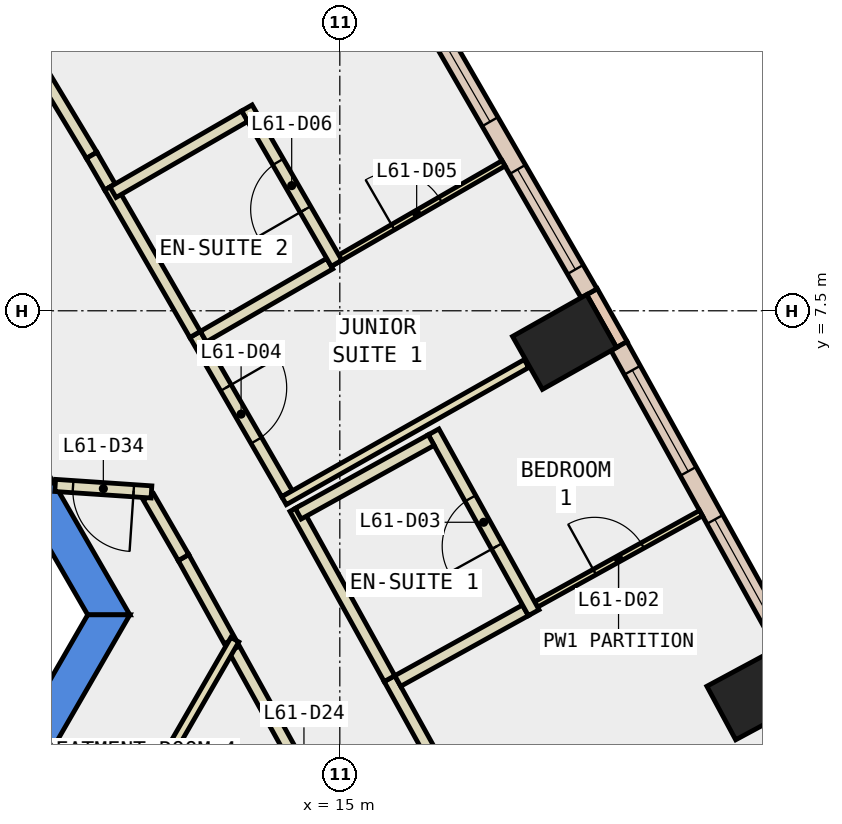
"""IFC4 building model, lengths in metres.
Left out: names, types, materials, properties, quantities, classifications, styles, units other than length and angle.
Written with IfcOpenShell. Run it as: python <this file> out.ifc"""

import sys

from ifc_helpers import new_model, si_unit, direction, frame, frame_2d, origin, origin_2d, place, context, subcontext, project, spatial, polyline, rectangle, outline, extrude, element, fill, save


model = new_model("IFC4")
c1 = context("Model", 3, precision=1e-05, world=origin(), true_north=direction((0.0, 1.0)))
c2 = subcontext(c1, "Body", "Model", "MODEL_VIEW")
j1 = project(units=[si_unit("LENGTHUNIT", "METRE"), si_unit("PLANEANGLEUNIT", "RADIAN")], contexts=[c1])
p1 = place(None, origin())
s1 = spatial("IfcSite", under=j1, at=p1, CompositionType="ELEMENT")
p2 = place(p1, origin())
s2 = spatial("IfcBuilding", under=s1, at=p2, CompositionType="ELEMENT")
p3 = place(p2, frame((0.0, 0.0, 266.6)))
s3 = spatial("IfcBuildingStorey", under=s2, at=p3, CompositionType="ELEMENT", Elevation=266.6)
for number, where, z_axis, x_axis in (
    (1, (21.89, 1.217, -0.34), (0.0, 0.0, 1.0), (-0.474, 0.881, 0.0)),
    (2, (18.696, 6.987, -0.34), (0.0, 0.0, 1.0), (-0.491, 0.871, 0.0)),
):
    element("IfcColumn", number, at=place(p3, frame(where, z_axis=z_axis, x_axis=x_axis)), inside=s3, PredefinedType="COLUMN", context=c2, shape_type="SweptSolid", body=[
        extrude(rectangle(XDim=1.0, YDim=1.4, at=origin_2d()), origin(), (0.0, 0.0, 1.0), 3.6),
    ])
p4 = place(p3, frame((0.0, 0.0, -0.34)))
e3 = element("IfcWall", 3, at=p4, inside=s3, PredefinedType="SHEAR", context=c2, shape_type="SweptSolid", body=[
    extrude(outline(polyline([(6.786, 10.747), (6.266, 10.447), (10.854, 2.5), (11.547, 2.5), (6.786, 10.747)])), origin(), (0.0, 0.0, 1.0), 3.6),
])
p5 = place(p3, frame((0.0, 0.0, -0.34)))
e4 = element("IfcWall", 4, at=p5, inside=s3, PredefinedType="SHEAR", context=c2, shape_type="SweptSolid", body=[
    extrude(outline(polyline([(5.774, -7.5), (11.547, 2.5), (10.854, 2.5), (5.427, -6.9), (5.774, -7.5)])), origin(), (0.0, 0.0, 1.0), 3.6),
])
p6 = place(p3, frame((19.639, 6.944, 0.0), z_axis=(0.0, 0.0, 1.0), x_axis=(-0.491848119507, 0.870681013539, 0.0)))
e5 = element("IfcWall", 5, at=p6, inside=s3, PredefinedType="STANDARD", context=c2, shape_type="SweptSolid", body=[
    extrude(rectangle(XDim=1.0, YDim=0.2, at=frame_2d((0.5, 0.0))), origin(), (0.0, 0.0, 1.0), 3.26),
])
p7 = place(p3, frame((22.308, 2.01, 0.0), z_axis=(0.0, 0.0, 1.0), x_axis=(-0.484260568952, 0.874923826032, 0.0)))
e6 = element("IfcWall", 6, at=p7, inside=s3, PredefinedType="STANDARD", context=c2, shape_type="SweptSolid", body=[
    extrude(rectangle(XDim=5.611, YDim=0.3, at=frame_2d((2.805, 0.0))), origin(), (0.0, 0.0, 1.0), 3.26),
])
p8 = place(p7, frame((0.453, 0.0, 0.9)))
e7 = element("IfcOpeningElement", 7, at=p8, cuts=e6, PredefinedType="OPENING", context=c2, shape_type="SweptSolid", body=[
    extrude(rectangle(XDim=1.9, YDim=2.0, at=frame_2d((0.95, 1.0))), frame((0.0, 0.16, 0.0), z_axis=(0.0, -1.0, 0.0), x_axis=(1.0, 0.0, 0.0)), (0.0, 0.0, 1.0), 0.32),
])
p9 = place(p7, frame((3.258, 0.0, 0.9)))
e8 = element("IfcOpeningElement", 8, at=p9, cuts=e6, PredefinedType="OPENING", context=c2, shape_type="SweptSolid", body=[
    extrude(rectangle(XDim=1.9, YDim=2.0, at=frame_2d((0.95, 1.0))), frame((0.0, 0.16, 0.0), z_axis=(0.0, -1.0, 0.0), x_axis=(1.0, 0.0, 0.0)), (0.0, 0.0, 1.0), 0.32),
])
p10 = place(p3, frame((19.1, 7.787, 0.0), z_axis=(0.0, 0.0, 1.0), x_axis=(-0.500041292042, 0.866001562501, 0.0)))
e9 = element("IfcWall", 9, at=p10, inside=s3, PredefinedType="STANDARD", context=c2, shape_type="SweptSolid", body=[
    extrude(rectangle(XDim=5.612, YDim=0.3, at=frame_2d((2.806, 0.0))), origin(), (0.0, 0.0, 1.0), 3.26),
])
p11 = place(p10, frame((0.453, 0.0, 0.9)))
e10 = element("IfcOpeningElement", 10, at=p11, cuts=e9, PredefinedType="OPENING", context=c2, shape_type="SweptSolid", body=[
    extrude(rectangle(XDim=1.9, YDim=2.0, at=frame_2d((0.95, 1.0))), frame((0.0, 0.16, 0.0), z_axis=(0.0, -1.0, 0.0), x_axis=(1.0, 0.0, 0.0)), (0.0, 0.0, 1.0), 0.32),
])
p12 = place(p10, frame((3.259, 0.0, 0.9)))
e11 = element("IfcOpeningElement", 11, at=p12, cuts=e9, PredefinedType="OPENING", context=c2, shape_type="SweptSolid", body=[
    extrude(rectangle(XDim=1.9, YDim=2.0, at=frame_2d((0.95, 1.0))), frame((0.0, 0.16, 0.0), z_axis=(0.0, -1.0, 0.0), x_axis=(1.0, 0.0, 0.0)), (0.0, 0.0, 1.0), 0.32),
])
p13 = place(p3, frame((13.188, 2.071, 0.0), z_axis=(0.0, 0.0, 1.0), x_axis=(-0.484398936474, 0.874847226859, 0.0)))
e12 = element("IfcWall", 12, at=p13, inside=s3, PredefinedType="PARTITIONING", context=c2, shape_type="SweptSolid", body=[
    extrude(rectangle(XDim=1.567, YDim=0.2, at=frame_2d((0.783, 0.0))), origin(), (0.0, 0.0, 1.0), 3.26),
])
p14 = place(p3, frame((12.429, 3.442, 0.0), z_axis=(0.0, 0.0, 1.0), x_axis=(-0.500076612374, 0.865981167091, 0.0)))
e13 = element("IfcWall", 13, at=p14, inside=s3, PredefinedType="PARTITIONING", context=c2, shape_type="SweptSolid", body=[
    extrude(rectangle(XDim=1.154, YDim=0.2, at=frame_2d((0.577, 0.0))), origin(), (0.0, 0.0, 1.0), 3.26),
])
p15 = place(p3, frame((11.902, 4.521, 0.0), z_axis=(0.0, 0.0, 1.0), x_axis=(-0.997726217037, 0.067397298437, 0.0)))
e14 = element("IfcWall", 14, at=p15, inside=s3, PredefinedType="PARTITIONING", context=c2, shape_type="SweptSolid", body=[
    extrude(rectangle(XDim=1.587, YDim=0.2, at=frame_2d((0.793, 0.0))), origin(), (0.0, 0.0, 1.0), 3.26),
])
p16 = place(p15, frame((0.293, 0.0, 0.0)))
e15 = element("IfcOpeningElement", 15, at=p16, cuts=e14, PredefinedType="OPENING", context=c2, shape_type="SweptSolid", body=[
    extrude(rectangle(XDim=1.0, YDim=2.1, at=frame_2d((0.5, 1.05))), frame((0.0, 0.11, 0.0), z_axis=(0.0, -1.0, 0.0), x_axis=(1.0, 0.0, 0.0)), (0.0, 0.0, 1.0), 0.22),
])
p17 = place(p3, frame((15.56, -2.214, 0.0), z_axis=(0.0, 0.0, 1.0), x_axis=(-0.484323615817, 0.874888927329, 0.0)))
e16 = element("IfcWall", 16, at=p17, inside=s3, PredefinedType="PARTITIONING", context=c2, shape_type="SweptSolid", body=[
    extrude(rectangle(XDim=4.747, YDim=0.2, at=frame_2d((2.374, 0.0))), origin(), (0.0, 0.0, 1.0), 3.26),
])
p18 = place(p17, frame((1.874, 0.0, 0.0)))
e17 = element("IfcOpeningElement", 17, at=p18, cuts=e16, PredefinedType="OPENING", context=c2, shape_type="SweptSolid", body=[
    extrude(rectangle(XDim=1.0, YDim=2.1, at=frame_2d((0.5, 1.05))), frame((0.0, 0.11, 0.0), z_axis=(0.0, -1.0, 0.0), x_axis=(1.0, 0.0, 0.0)), (0.0, 0.0, 1.0), 0.22),
])
p19 = place(p3, frame((15.817, 1.451, 0.0), z_axis=(0.0, 0.0, 1.0), x_axis=(0.48417811398, -0.874969458863, 0.0)))
e18 = element("IfcWall", 18, at=p19, inside=s3, PredefinedType="PARTITIONING", context=c2, shape_type="SweptSolid", body=[
    extrude(rectangle(XDim=3.101, YDim=0.2, at=frame_2d((1.55, 0.0))), origin(), (0.0, 0.0, 1.0), 3.26),
])
p20 = place(p3, frame((14.267, 4.25, 0.0), z_axis=(0.0, 0.0, 1.0), x_axis=(0.4843920198, -0.874851056554, 0.0)))
e19 = element("IfcWall", 19, at=p20, inside=s3, PredefinedType="PARTITIONING", context=c2, shape_type="SweptSolid", body=[
    extrude(rectangle(XDim=3.199, YDim=0.2, at=frame_2d((1.6, 0.0))), origin(), (0.0, 0.0, 1.0), 3.26),
])
p21 = place(p3, frame((12.62, 7.111, 0.0), z_axis=(0.0, 0.0, 1.0), x_axis=(0.499950733426, -0.866053845986, 0.0)))
e20 = element("IfcWall", 20, at=p21, inside=s3, PredefinedType="PARTITIONING", context=c2, shape_type="SweptSolid", body=[
    extrude(rectangle(XDim=3.024, YDim=0.2, at=frame_2d((1.512, 0.0))), origin(), (0.0, 0.0, 1.0), 3.26),
])
p22 = place(p21, frame((1.013, 0.0, 0.0)))
e21 = element("IfcOpeningElement", 21, at=p22, cuts=e20, PredefinedType="OPENING", context=c2, shape_type="SweptSolid", body=[
    extrude(rectangle(XDim=1.0, YDim=2.1, at=frame_2d((0.5, 1.05))), frame((0.0, 0.11, 0.0), z_axis=(0.0, -1.0, 0.0), x_axis=(1.0, 0.0, 0.0)), (0.0, 0.0, 1.0), 0.22),
])
p23 = place(p3, frame((9.281, 12.779, 0.0), z_axis=(0.0, 0.0, 1.0), x_axis=(0.515568955032, -0.856848091908, 0.0)))
e22 = element("IfcWall", 22, at=p23, inside=s3, PredefinedType="PARTITIONING", context=c2, shape_type="SweptSolid", body=[
    extrude(rectangle(XDim=3.177, YDim=0.2, at=frame_2d((1.588, 0.0))), origin(), (0.0, 0.0, 1.0), 3.26),
])
p24 = place(p3, frame((10.919, 10.057, 0.0), z_axis=(0.0, 0.0, 1.0), x_axis=(0.500284357783, -0.865861167485, 0.0)))
e23 = element("IfcWall", 23, at=p24, inside=s3, PredefinedType="PARTITIONING", context=c2, shape_type="SweptSolid", body=[
    extrude(rectangle(XDim=0.602, YDim=0.2, at=frame_2d((0.301, 0.0))), origin(), (0.0, 0.0, 1.0), 3.26),
])
p25 = place(p3, frame((11.22, 9.536, 0.0), z_axis=(0.0, 0.0, 1.0), x_axis=(0.500049511043, -0.865996816683, 0.0)))
e24 = element("IfcWall", 24, at=p25, inside=s3, PredefinedType="PARTITIONING", context=c2, shape_type="SweptSolid", body=[
    extrude(rectangle(XDim=2.8, YDim=0.2, at=frame_2d((1.4, 0.0))), origin(), (0.0, 0.0, 1.0), 3.26),
])
p26 = place(p3, frame((18.228, 2.671, 0.0), z_axis=(0.0, 0.0, 1.0), x_axis=(0.874895591854, 0.484311576729, 0.0)))
e25 = element("IfcWall", 25, at=p26, inside=s3, PredefinedType="PARTITIONING", context=c2, shape_type="SweptSolid", body=[
    extrude(rectangle(XDim=3.1, YDim=0.1, at=frame_2d((1.55, 0.0))), origin(), (0.0, 0.0, 1.0), 3.26),
])
p27 = place(p26, frame((1.1, 0.0, 0.0)))
e26 = element("IfcOpeningElement", 26, at=p27, cuts=e25, PredefinedType="OPENING", context=c2, shape_type="SweptSolid", body=[
    extrude(rectangle(XDim=0.9, YDim=2.1, at=frame_2d((0.45, 1.05))), frame((0.0, 0.06, 0.0), z_axis=(0.0, -1.0, 0.0), x_axis=(1.0, 0.0, 0.0)), (0.0, 0.0, 1.0), 0.12),
])
p28 = place(p3, frame((15.953, 1.412, 0.0), z_axis=(0.0, 0.0, 1.0), x_axis=(0.875014790305, 0.484096185429, 0.0)))
e27 = element("IfcWall", 27, at=p28, inside=s3, PredefinedType="PARTITIONING", context=c2, shape_type="SweptSolid", body=[
    extrude(rectangle(XDim=2.4, YDim=0.2, at=frame_2d((1.2, 0.0))), origin(), (0.0, 0.0, 1.0), 3.26),
])
p29 = place(p3, frame((18.189, 2.535, 0.0), z_axis=(0.0, 0.0, 1.0), x_axis=(-0.484447408253, 0.874820386501, 0.0)))
e28 = element("IfcWall", 28, at=p29, inside=s3, PredefinedType="PARTITIONING", context=c2, shape_type="SweptSolid", body=[
    extrude(rectangle(XDim=3.4, YDim=0.2, at=frame_2d((1.7, 0.0))), origin(), (0.0, 0.0, 1.0), 3.26),
])
p30 = place(p29, frame((1.25, 0.0, 0.0)))
e29 = element("IfcOpeningElement", 29, at=p30, cuts=e28, PredefinedType="OPENING", context=c2, shape_type="SweptSolid", body=[
    extrude(rectangle(XDim=0.9, YDim=2.1, at=frame_2d((0.45, 1.05))), frame((0.0, 0.11, 0.0), z_axis=(0.0, -1.0, 0.0), x_axis=(1.0, 0.0, 0.0)), (0.0, 0.0, 1.0), 0.22),
])
p31 = place(p3, frame((16.503, 5.374, 0.0), z_axis=(0.0, 0.0, 1.0), x_axis=(-0.874847389013, -0.484398643615, 0.0)))
e30 = element("IfcWall", 30, at=p31, inside=s3, PredefinedType="PARTITIONING", context=c2, shape_type="SweptSolid", body=[
    extrude(rectangle(XDim=2.5, YDim=0.2, at=frame_2d((1.25, 0.0))), origin(), (0.0, 0.0, 1.0), 3.26),
])
p32 = place(p3, frame((14.083, 4.377, 0.0), z_axis=(0.0, 0.0, 1.0), x_axis=(0.870415885751, 0.492317159799, 0.0)))
e31 = element("IfcWall", 31, at=p32, inside=s3, PredefinedType="PARTITIONING", context=c2, shape_type="SweptSolid", body=[
    extrude(rectangle(XDim=4.581, YDim=0.15, at=frame_2d((2.29, 0.0))), origin(), (0.0, 0.0, 1.0), 3.26),
])
p33 = place(p3, frame((14.835, 8.275, 0.0), z_axis=(0.0, 0.0, 1.0), x_axis=(0.8660266723, 0.49999780286, 0.0)))
e32 = element("IfcWall", 32, at=p33, inside=s3, PredefinedType="PARTITIONING", context=c2, shape_type="SweptSolid", body=[
    extrude(rectangle(XDim=3.3, YDim=0.1, at=frame_2d((1.65, 0.0))), origin(), (0.0, 0.0, 1.0), 3.26),
])
p34 = place(p33, frame((1.2, 0.0, 0.0)))
e33 = element("IfcOpeningElement", 33, at=p34, cuts=e32, PredefinedType="OPENING", context=c2, shape_type="SweptSolid", body=[
    extrude(rectangle(XDim=0.9, YDim=2.1, at=frame_2d((0.45, 1.05))), frame((0.0, 0.06, 0.0), z_axis=(0.0, -1.0, 0.0), x_axis=(1.0, 0.0, 0.0)), (0.0, 0.0, 1.0), 0.12),
])
p35 = place(p3, frame((12.756, 7.075, 0.0), z_axis=(0.0, 0.0, 1.0), x_axis=(0.866075499611, 0.499913221443, 0.0)))
e34 = element("IfcWall", 34, at=p35, inside=s3, PredefinedType="PARTITIONING", context=c2, shape_type="SweptSolid", body=[
    extrude(rectangle(XDim=2.4, YDim=0.2, at=frame_2d((1.2, 0.0))), origin(), (0.0, 0.0, 1.0), 3.26),
])
p36 = place(p3, frame((14.946, 8.281, 0.0), z_axis=(0.0, 0.0, 1.0), x_axis=(-0.500001826776, 0.866024349092, 0.0)))
e35 = element("IfcWall", 35, at=p36, inside=s3, PredefinedType="PARTITIONING", context=c2, shape_type="SweptSolid", body=[
    extrude(rectangle(XDim=2.95, YDim=0.2, at=frame_2d((1.475, 0.0))), origin(), (0.0, 0.0, 1.0), 3.26),
])
p37 = place(p36, frame((1.025, 0.0, 0.0)))
e36 = element("IfcOpeningElement", 36, at=p37, cuts=e35, PredefinedType="OPENING", context=c2, shape_type="SweptSolid", body=[
    extrude(rectangle(XDim=0.9, YDim=2.1, at=frame_2d((0.45, 1.05))), frame((0.0, 0.11, 0.0), z_axis=(0.0, -1.0, 0.0), x_axis=(1.0, 0.0, 0.0)), (0.0, 0.0, 1.0), 0.22),
])
p38 = place(p3, frame((13.435, 10.7, 0.0), z_axis=(0.0, 0.0, 1.0), x_axis=(-0.866022959057, -0.500004234368, 0.0)))
e37 = element("IfcWall", 37, at=p38, inside=s3, PredefinedType="PARTITIONING", context=c2, shape_type="SweptSolid", body=[
    extrude(rectangle(XDim=2.5, YDim=0.2, at=frame_2d((1.25, 0.0))), origin(), (0.0, 0.0, 1.0), 3.26),
])
p39 = place(p3, frame((9.25, -4.878, 0.0), z_axis=(0.0, 0.0, 1.0), x_axis=(0.499982416899, 0.866035555154, 0.0)))
e38 = element("IfcWall", 38, at=p39, inside=s3, PredefinedType="PARTITIONING", context=c2, shape_type="SweptSolid", body=[
    extrude(rectangle(XDim=8.048, YDim=0.15, at=frame_2d((4.024, 0.0))), origin(), (0.0, 0.0, 1.0), 3.26),
])
p40 = place(p8, origin())
e39 = element("IfcWindow", 39, at=p40, inside=s3, PartitioningType="SINGLE_PANEL", PredefinedType="WINDOW", context=c2, shape_type="SweptSolid", body=[
    extrude(rectangle(XDim=1.9, YDim=2.0, at=frame_2d((0.95, 1.0))), frame((0.0, 0.03, 0.0), z_axis=(0.0, -1.0, 0.0), x_axis=(1.0, 0.0, 0.0)), (0.0, 0.0, 1.0), 0.06),
])
fill(e7, e39)
p41 = place(p9, origin())
e40 = element("IfcWindow", 40, at=p41, inside=s3, PartitioningType="SINGLE_PANEL", PredefinedType="WINDOW", context=c2, shape_type="SweptSolid", body=[
    extrude(rectangle(XDim=1.9, YDim=2.0, at=frame_2d((0.95, 1.0))), frame((0.0, 0.03, 0.0), z_axis=(0.0, -1.0, 0.0), x_axis=(1.0, 0.0, 0.0)), (0.0, 0.0, 1.0), 0.06),
])
fill(e8, e40)
p42 = place(p11, origin())
e41 = element("IfcWindow", 41, at=p42, inside=s3, PartitioningType="SINGLE_PANEL", PredefinedType="WINDOW", context=c2, shape_type="SweptSolid", body=[
    extrude(rectangle(XDim=1.9, YDim=2.0, at=frame_2d((0.95, 1.0))), frame((0.0, 0.03, 0.0), z_axis=(0.0, -1.0, 0.0), x_axis=(1.0, 0.0, 0.0)), (0.0, 0.0, 1.0), 0.06),
])
fill(e10, e41)
p43 = place(p12, origin())
e42 = element("IfcWindow", 42, at=p43, inside=s3, PartitioningType="SINGLE_PANEL", PredefinedType="WINDOW", context=c2, shape_type="SweptSolid", body=[
    extrude(rectangle(XDim=1.9, YDim=2.0, at=frame_2d((0.95, 1.0))), frame((0.0, 0.03, 0.0), z_axis=(0.0, -1.0, 0.0), x_axis=(1.0, 0.0, 0.0)), (0.0, 0.0, 1.0), 0.06),
])
fill(e11, e42)
p44 = place(p27, origin())
e43 = element("IfcDoor", 43, at=p44, inside=s3, OperationType="SINGLE_SWING_RIGHT", PredefinedType="DOOR", context=c2, shape_type="SweptSolid", body=[
    extrude(rectangle(XDim=0.9, YDim=2.1, at=frame_2d((0.45, 1.05))), frame((0.0, 0.025, 0.0), z_axis=(0.0, -1.0, 0.0), x_axis=(1.0, 0.0, 0.0)), (0.0, 0.0, 1.0), 0.05),
])
fill(e26, e43)
p45 = place(p30, origin())
e44 = element("IfcDoor", 44, at=p45, inside=s3, OperationType="SINGLE_SWING_LEFT", PredefinedType="DOOR", context=c2, shape_type="SweptSolid", body=[
    extrude(rectangle(XDim=0.9, YDim=2.1, at=frame_2d((0.45, 1.05))), frame((0.0, 0.025, 0.0), z_axis=(0.0, -1.0, 0.0), x_axis=(1.0, 0.0, 0.0)), (0.0, 0.0, 1.0), 0.05),
])
fill(e29, e44)
p46 = place(p22, origin())
e45 = element("IfcDoor", 45, at=p46, inside=s3, OperationType="SINGLE_SWING_LEFT", PredefinedType="DOOR", context=c2, shape_type="SweptSolid", body=[
    extrude(rectangle(XDim=1.0, YDim=2.1, at=frame_2d((0.5, 1.05))), frame((0.0, 0.025, 0.0), z_axis=(0.0, -1.0, 0.0), x_axis=(1.0, 0.0, 0.0)), (0.0, 0.0, 1.0), 0.05),
])
fill(e21, e45)
p47 = place(p34, origin())
e46 = element("IfcDoor", 46, at=p47, inside=s3, OperationType="SINGLE_SWING_RIGHT", PredefinedType="DOOR", context=c2, shape_type="SweptSolid", body=[
    extrude(rectangle(XDim=0.9, YDim=2.1, at=frame_2d((0.45, 1.05))), frame((0.0, 0.025, 0.0), z_axis=(0.0, -1.0, 0.0), x_axis=(1.0, 0.0, 0.0)), (0.0, 0.0, 1.0), 0.05),
])
fill(e33, e46)
p48 = place(p37, origin())
e47 = element("IfcDoor", 47, at=p48, inside=s3, OperationType="SINGLE_SWING_LEFT", PredefinedType="DOOR", context=c2, shape_type="SweptSolid", body=[
    extrude(rectangle(XDim=0.9, YDim=2.1, at=frame_2d((0.45, 1.05))), frame((0.0, 0.025, 0.0), z_axis=(0.0, -1.0, 0.0), x_axis=(1.0, 0.0, 0.0)), (0.0, 0.0, 1.0), 0.05),
])
fill(e36, e47)
p49 = place(p16, origin())
e48 = element("IfcDoor", 48, at=p49, inside=s3, OperationType="SINGLE_SWING_LEFT", PredefinedType="DOOR", context=c2, shape_type="SweptSolid", body=[
    extrude(rectangle(XDim=1.0, YDim=2.1, at=frame_2d((0.5, 1.05))), frame((0.0, 0.025, 0.0), z_axis=(0.0, -1.0, 0.0), x_axis=(1.0, 0.0, 0.0)), (0.0, 0.0, 1.0), 0.05),
])
fill(e15, e48)
save(model, sys.argv[1])
